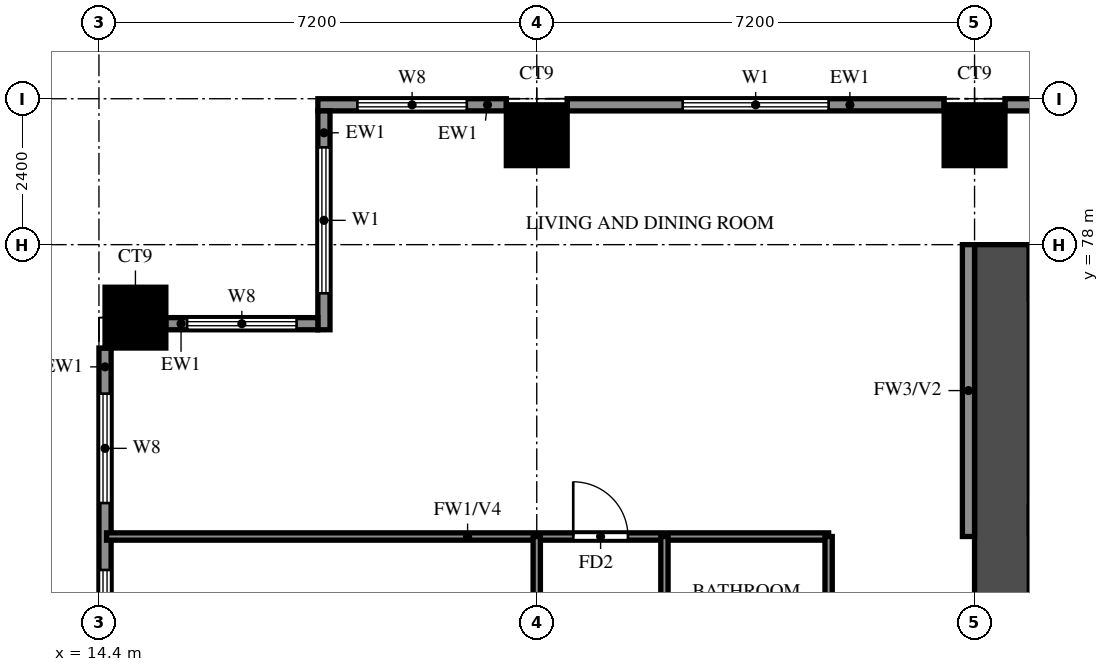
"""IFC4 building model, lengths in metres.
Left out: names, types, materials, properties, quantities, classifications, styles, units other than length and angle.
Written with IfcOpenShell. Run it as: python <this file> out.ifc"""

import sys

from ifc_helpers import new_model, si_unit, direction, frame, frame_2d, origin, origin_2d, place, context, subcontext, project, spatial, rectangle, extrude, source, transform, mapped, element, fill, save


model = new_model("IFC4")
c1 = context("Model", 3, precision=1e-05, world=origin(), true_north=direction((0.0, 1.0)))
c2 = subcontext(c1, "Body", "Model", "MODEL_VIEW")
j1 = project(units=[si_unit("LENGTHUNIT", "METRE"), si_unit("PLANEANGLEUNIT", "RADIAN")], contexts=[c1])
p1 = place(None, origin())
s1 = spatial("IfcSite", under=j1, at=p1, CompositionType="ELEMENT")
p2 = place(p1, origin())
s2 = spatial("IfcBuilding", under=s1, at=p2, CompositionType="ELEMENT")
p3 = place(p2, frame((0.0, 0.0, 76.0)))
s3 = spatial("IfcBuildingStorey", under=s2, at=p3, CompositionType="ELEMENT", Elevation=76.0)
m1 = source(origin(), c2, "Body", "SweptSolid", [
    extrude(rectangle(XDim=1.0, YDim=1.0, at=origin_2d()), origin(), (0.0, 0.0, 1.0), 3.18),
])
for number, where, z_axis, x_axis in (
    (1, (15.0, 76.8, 0.0), (0.0, 0.0, 1.0), (1.0, 0.0, 0.0)),
    (2, (21.6, 79.8, 0.0), (0.0, 0.0, 1.0), (1.0, 0.0, 0.0)),
    (3, (28.8, 79.8, 0.0), (0.0, 0.0, 1.0), (1.0, 0.0, 0.0)),
):
    element("IfcColumn", number, at=place(p3, frame(where, z_axis=z_axis, x_axis=x_axis)), inside=s3, PredefinedType="COLUMN", context=c2, shape_type="MappedRepresentation", body=[
        mapped(m1, transform((0.0, 0.0, 0.0))),
    ])
p4 = place(p3, frame((29.25, 66.0, 0.0), z_axis=(0.0, 0.0, 1.0), x_axis=(0.0, 1.0, 0.0)))
e4 = element("IfcWall", 4, at=p4, inside=s3, PredefinedType="SHEAR", context=c2, shape_type="SweptSolid", body=[
    extrude(rectangle(XDim=12.0, YDim=0.9, at=frame_2d((6.0, 0.0))), origin(), (0.0, 0.0, 1.0), 3.18),
])
p5 = place(p3, frame((29.7, 73.475, 0.0), z_axis=(0.0, 0.0, 1.0), x_axis=(1.0, 0.0, 0.0)))
e5 = element("IfcWall", 5, at=p5, inside=s3, PredefinedType="SHEAR", context=c2, shape_type="SweptSolid", body=[
    extrude(rectangle(XDim=3.175, YDim=0.45, at=frame_2d((1.587, 0.0))), origin(), (0.0, 0.0, 1.0), 3.18),
])
p6 = place(p3, frame((35.5, 80.3, 0.0), z_axis=(0.0, 0.0, 1.0), x_axis=(-1.0, 0.0, 0.0)))
e6 = element("IfcWall", 6, at=p6, inside=s3, PredefinedType="SOLIDWALL", context=c2, shape_type="SweptSolid", body=[
    extrude(rectangle(XDim=6.2, YDim=0.2, at=frame_2d((3.1, 0.0))), origin(), (0.0, 0.0, 1.0), 3.18),
])
p7 = place(p3, frame((28.3, 80.3, 0.0), z_axis=(0.0, 0.0, 1.0), x_axis=(-1.0, 0.0, 0.0)))
e7 = element("IfcWall", 7, at=p7, inside=s3, PredefinedType="SOLIDWALL", context=c2, shape_type="SweptSolid", body=[
    extrude(rectangle(XDim=6.2, YDim=0.2, at=frame_2d((3.1, 0.0))), origin(), (0.0, 0.0, 1.0), 3.18),
])
p8 = place(p7, frame((1.9, 0.0, 0.6)))
e8 = element("IfcOpeningElement", 8, at=p8, cuts=e7, PredefinedType="OPENING", context=c2, shape_type="SweptSolid", body=[
    extrude(rectangle(XDim=2.4, YDim=2.4, at=frame_2d((1.2, 1.2))), frame((0.0, 0.11, 0.0), z_axis=(0.0, -1.0, 0.0), x_axis=(1.0, 0.0, 0.0)), (0.0, 0.0, 1.0), 0.22),
])
p9 = place(p3, frame((21.1, 80.3, 0.0), z_axis=(0.0, 0.0, 1.0), x_axis=(-1.0, 0.0, 0.0)))
e9 = element("IfcWall", 9, at=p9, inside=s3, PredefinedType="SOLIDWALL", context=c2, shape_type="SweptSolid", body=[
    extrude(rectangle(XDim=3.1, YDim=0.2, at=frame_2d((1.55, 0.0))), origin(), (0.0, 0.0, 1.0), 3.18),
])
p10 = place(p9, frame((0.65, 0.0, 0.6)))
e10 = element("IfcOpeningElement", 10, at=p10, cuts=e9, PredefinedType="OPENING", context=c2, shape_type="SweptSolid", body=[
    extrude(rectangle(XDim=1.8, YDim=2.4, at=frame_2d((0.9, 1.2))), frame((0.0, 0.11, 0.0), z_axis=(0.0, -1.0, 0.0), x_axis=(1.0, 0.0, 0.0)), (0.0, 0.0, 1.0), 0.22),
])
p11 = place(p3, frame((18.1, 80.2, 0.0), z_axis=(0.0, 0.0, 1.0), x_axis=(0.0, -1.0, 0.0)))
e11 = element("IfcWall", 11, at=p11, inside=s3, PredefinedType="SOLIDWALL", context=c2, shape_type="SweptSolid", body=[
    extrude(rectangle(XDim=3.6, YDim=0.2, at=frame_2d((1.8, 0.0))), origin(), (0.0, 0.0, 1.0), 3.18),
])
p12 = place(p11, frame((0.6, 0.0, 0.6)))
e12 = element("IfcOpeningElement", 12, at=p12, cuts=e11, PredefinedType="OPENING", context=c2, shape_type="SweptSolid", body=[
    extrude(rectangle(XDim=2.4, YDim=2.4, at=frame_2d((1.2, 1.2))), frame((0.0, 0.11, 0.0), z_axis=(0.0, -1.0, 0.0), x_axis=(1.0, 0.0, 0.0)), (0.0, 0.0, 1.0), 0.22),
])
p13 = place(p3, frame((18.0, 76.7, 0.0), z_axis=(0.0, 0.0, 1.0), x_axis=(-1.0, 0.0, 0.0)))
e13 = element("IfcWall", 13, at=p13, inside=s3, PredefinedType="SOLIDWALL", context=c2, shape_type="SweptSolid", body=[
    extrude(rectangle(XDim=2.5, YDim=0.2, at=frame_2d((1.25, 0.0))), origin(), (0.0, 0.0, 1.0), 3.18),
])
p14 = place(p13, frame((0.35, 0.0, 0.6)))
e14 = element("IfcOpeningElement", 14, at=p14, cuts=e13, PredefinedType="OPENING", context=c2, shape_type="SweptSolid", body=[
    extrude(rectangle(XDim=1.8, YDim=2.4, at=frame_2d((0.9, 1.2))), frame((0.0, 0.11, 0.0), z_axis=(0.0, -1.0, 0.0), x_axis=(1.0, 0.0, 0.0)), (0.0, 0.0, 1.0), 0.22),
])
p15 = place(p3, frame((14.5, 76.3, 0.0), z_axis=(0.0, 0.0, 1.0), x_axis=(0.0, -1.0, 0.0)))
e15 = element("IfcWall", 15, at=p15, inside=s3, PredefinedType="SOLIDWALL", context=c2, shape_type="SweptSolid", body=[
    extrude(rectangle(XDim=6.2, YDim=0.2, at=frame_2d((3.1, 0.0))), origin(), (0.0, 0.0, 1.0), 3.18),
])
p16 = place(p15, frame((3.65, 0.0, 0.6)))
e16 = element("IfcOpeningElement", 16, at=p16, cuts=e15, PredefinedType="OPENING", context=c2, shape_type="SweptSolid", body=[
    extrude(rectangle(XDim=1.8, YDim=2.4, at=frame_2d((0.9, 1.2))), frame((0.0, 0.11, 0.0), z_axis=(0.0, -1.0, 0.0), x_axis=(1.0, 0.0, 0.0)), (0.0, 0.0, 1.0), 0.22),
])
p17 = place(p15, frame((0.75, 0.0, 0.6)))
e17 = element("IfcOpeningElement", 17, at=p17, cuts=e15, PredefinedType="OPENING", context=c2, shape_type="SweptSolid", body=[
    extrude(rectangle(XDim=1.8, YDim=2.4, at=frame_2d((0.9, 1.2))), frame((0.0, 0.11, 0.0), z_axis=(0.0, -1.0, 0.0), x_axis=(1.0, 0.0, 0.0)), (0.0, 0.0, 1.0), 0.22),
])
p18 = place(p3, frame((28.7, 73.2, 0.0), z_axis=(0.0, 0.0, 1.0), x_axis=(0.0, 1.0, 0.0)))
e18 = element("IfcWall", 18, at=p18, inside=s3, PredefinedType="SOLIDWALL", context=c2, shape_type="SweptSolid", body=[
    extrude(rectangle(XDim=4.8, YDim=0.2, at=frame_2d((2.4, 0.0))), origin(), (0.0, 0.0, 1.0), 3.18),
])
p19 = place(p3, frame((14.525, 73.2, 0.0), z_axis=(0.0, 0.0, 1.0), x_axis=(1.0, 0.0, 0.0)))
e19 = element("IfcWall", 19, at=p19, inside=s3, PredefinedType="PARTITIONING", context=c2, shape_type="SweptSolid", body=[
    extrude(rectangle(XDim=11.875, YDim=0.12, at=frame_2d((5.938, 0.0))), origin(), (0.0, 0.0, 1.0), 2.28),
])
p20 = place(p19, frame((7.675, 0.0, 0.0)))
e20 = element("IfcOpeningElement", 20, at=p20, cuts=e19, PredefinedType="OPENING", context=c2, shape_type="SweptSolid", body=[
    extrude(rectangle(XDim=0.9, YDim=2.1, at=frame_2d((0.45, 1.05))), frame((0.0, 0.07, 0.0), z_axis=(0.0, -1.0, 0.0), x_axis=(1.0, 0.0, 0.0)), (0.0, 0.0, 1.0), 0.14),
])
p21 = place(p3, frame((21.6, 33.725, 0.0), z_axis=(0.0, 0.0, 1.0), x_axis=(0.0, 1.0, 0.0)))
e21 = element("IfcWall", 21, at=p21, inside=s3, PredefinedType="PARTITIONING", context=c2, shape_type="SweptSolid", body=[
    extrude(rectangle(XDim=39.475, YDim=0.12, at=frame_2d((19.737, 0.0))), origin(), (0.0, 0.0, 1.0), 3.18),
])
p22 = place(p21, frame((7.775, 0.0, 0.0)))
e22 = element("IfcOpeningElement", 22, at=p22, cuts=e21, PredefinedType="OPENING", context=c2, shape_type="SweptSolid", body=[
    extrude(rectangle(XDim=0.9, YDim=2.1, at=frame_2d((0.45, 1.05))), frame((0.0, 0.07, 0.0), z_axis=(0.0, -1.0, 0.0), x_axis=(1.0, 0.0, 0.0)), (0.0, 0.0, 1.0), 0.14),
])
p23 = place(p21, frame((17.125, 0.0, 0.0)))
e23 = element("IfcOpeningElement", 23, at=p23, cuts=e21, PredefinedType="OPENING", context=c2, shape_type="SweptSolid", body=[
    extrude(rectangle(XDim=1.5, YDim=2.1, at=frame_2d((0.75, 1.05))), frame((0.0, 0.07, 0.0), z_axis=(0.0, -1.0, 0.0), x_axis=(1.0, 0.0, 0.0)), (0.0, 0.0, 1.0), 0.14),
])
p24 = place(p21, frame((22.825, 0.0, 0.0)))
e24 = element("IfcOpeningElement", 24, at=p24, cuts=e21, PredefinedType="OPENING", context=c2, shape_type="SweptSolid", body=[
    extrude(rectangle(XDim=0.9, YDim=2.1, at=frame_2d((0.45, 1.05))), frame((0.0, 0.07, 0.0), z_axis=(0.0, -1.0, 0.0), x_axis=(1.0, 0.0, 0.0)), (0.0, 0.0, 1.0), 0.14),
])
p25 = place(p21, frame((26.425, 0.0, 0.0)))
e25 = element("IfcOpeningElement", 25, at=p25, cuts=e21, PredefinedType="OPENING", context=c2, shape_type="SweptSolid", body=[
    extrude(rectangle(XDim=0.9, YDim=2.1, at=frame_2d((0.45, 1.05))), frame((0.0, 0.07, 0.0), z_axis=(0.0, -1.0, 0.0), x_axis=(1.0, 0.0, 0.0)), (0.0, 0.0, 1.0), 0.14),
])
p26 = place(p21, frame((30.025, 0.0, 0.0)))
e26 = element("IfcOpeningElement", 26, at=p26, cuts=e21, PredefinedType="OPENING", context=c2, shape_type="SweptSolid", body=[
    extrude(rectangle(XDim=0.9, YDim=2.1, at=frame_2d((0.45, 1.05))), frame((0.0, 0.07, 0.0), z_axis=(0.0, -1.0, 0.0), x_axis=(1.0, 0.0, 0.0)), (0.0, 0.0, 1.0), 0.14),
])
p27 = place(p21, frame((33.625, 0.0, 0.0)))
e27 = element("IfcOpeningElement", 27, at=p27, cuts=e21, PredefinedType="OPENING", context=c2, shape_type="SweptSolid", body=[
    extrude(rectangle(XDim=0.9, YDim=2.1, at=frame_2d((0.45, 1.05))), frame((0.0, 0.07, 0.0), z_axis=(0.0, -1.0, 0.0), x_axis=(1.0, 0.0, 0.0)), (0.0, 0.0, 1.0), 0.14),
])
p28 = place(p21, frame((37.225, 0.0, 0.0)))
e28 = element("IfcOpeningElement", 28, at=p28, cuts=e21, PredefinedType="OPENING", context=c2, shape_type="SweptSolid", body=[
    extrude(rectangle(XDim=0.9, YDim=2.1, at=frame_2d((0.45, 1.05))), frame((0.0, 0.07, 0.0), z_axis=(0.0, -1.0, 0.0), x_axis=(1.0, 0.0, 0.0)), (0.0, 0.0, 1.0), 0.14),
])
p29 = place(p3, frame((23.7, 64.8, 0.0), z_axis=(0.0, 0.0, 1.0), x_axis=(0.0, 1.0, 0.0)))
e29 = element("IfcWall", 29, at=p29, inside=s3, PredefinedType="PARTITIONING", context=c2, shape_type="SweptSolid", body=[
    extrude(rectangle(XDim=8.4, YDim=0.12, at=frame_2d((4.2, 0.0))), origin(), (0.0, 0.0, 1.0), 3.18),
])
p30 = place(p29, frame((1.875, 0.0, 0.0)))
e30 = element("IfcOpeningElement", 30, at=p30, cuts=e29, PredefinedType="OPENING", context=c2, shape_type="SweptSolid", body=[
    extrude(rectangle(XDim=0.9, YDim=2.1, at=frame_2d((0.45, 1.05))), frame((0.0, 0.07, 0.0), z_axis=(0.0, -1.0, 0.0), x_axis=(1.0, 0.0, 0.0)), (0.0, 0.0, 1.0), 0.14),
])
p31 = place(p29, frame((6.125, 0.0, 0.0)))
e31 = element("IfcOpeningElement", 31, at=p31, cuts=e29, PredefinedType="OPENING", context=c2, shape_type="SweptSolid", body=[
    extrude(rectangle(XDim=0.8, YDim=2.1, at=frame_2d((0.4, 1.05))), frame((0.0, 0.07, 0.0), z_axis=(0.0, -1.0, 0.0), x_axis=(1.0, 0.0, 0.0)), (0.0, 0.0, 1.0), 0.14),
])
p32 = place(p3, frame((26.4, 69.62, 0.0), z_axis=(0.0, 0.0, 1.0), x_axis=(0.0, 1.0, 0.0)))
e32 = element("IfcWall", 32, at=p32, inside=s3, PredefinedType="PARTITIONING", context=c2, shape_type="SweptSolid", body=[
    extrude(rectangle(XDim=3.58, YDim=0.12, at=frame_2d((1.79, 0.0))), origin(), (0.0, 0.0, 1.0), 3.18),
])
p33 = place(p8, origin())
e33 = element("IfcWindow", 33, at=p33, inside=s3, PartitioningType="DOUBLE_PANEL_VERTICAL", PredefinedType="WINDOW", context=c2, shape_type="SweptSolid", body=[
    extrude(rectangle(XDim=2.4, YDim=2.4, at=frame_2d((1.2, 1.2))), frame((0.0, 0.03, 0.0), z_axis=(0.0, -1.0, 0.0), x_axis=(1.0, 0.0, 0.0)), (0.0, 0.0, 1.0), 0.06),
])
fill(e8, e33)
p34 = place(p10, origin())
e34 = element("IfcWindow", 34, at=p34, inside=s3, PartitioningType="DOUBLE_PANEL_VERTICAL", PredefinedType="WINDOW", context=c2, shape_type="SweptSolid", body=[
    extrude(rectangle(XDim=1.8, YDim=2.4, at=frame_2d((0.9, 1.2))), frame((0.0, 0.03, 0.0), z_axis=(0.0, -1.0, 0.0), x_axis=(1.0, 0.0, 0.0)), (0.0, 0.0, 1.0), 0.06),
])
fill(e10, e34)
p35 = place(p12, origin())
e35 = element("IfcWindow", 35, at=p35, inside=s3, PartitioningType="DOUBLE_PANEL_VERTICAL", PredefinedType="WINDOW", context=c2, shape_type="SweptSolid", body=[
    extrude(rectangle(XDim=2.4, YDim=2.4, at=frame_2d((1.2, 1.2))), frame((0.0, 0.03, 0.0), z_axis=(0.0, -1.0, 0.0), x_axis=(1.0, 0.0, 0.0)), (0.0, 0.0, 1.0), 0.06),
])
fill(e12, e35)
p36 = place(p14, origin())
e36 = element("IfcWindow", 36, at=p36, inside=s3, PartitioningType="DOUBLE_PANEL_VERTICAL", PredefinedType="WINDOW", context=c2, shape_type="SweptSolid", body=[
    extrude(rectangle(XDim=1.8, YDim=2.4, at=frame_2d((0.9, 1.2))), frame((0.0, 0.03, 0.0), z_axis=(0.0, -1.0, 0.0), x_axis=(1.0, 0.0, 0.0)), (0.0, 0.0, 1.0), 0.06),
])
fill(e14, e36)
p37 = place(p16, origin())
e37 = element("IfcWindow", 37, at=p37, inside=s3, PartitioningType="DOUBLE_PANEL_VERTICAL", PredefinedType="WINDOW", context=c2, shape_type="SweptSolid", body=[
    extrude(rectangle(XDim=1.8, YDim=2.4, at=frame_2d((0.9, 1.2))), frame((0.0, 0.03, 0.0), z_axis=(0.0, -1.0, 0.0), x_axis=(1.0, 0.0, 0.0)), (0.0, 0.0, 1.0), 0.06),
])
fill(e16, e37)
p38 = place(p17, origin())
e38 = element("IfcWindow", 38, at=p38, inside=s3, PartitioningType="DOUBLE_PANEL_VERTICAL", PredefinedType="WINDOW", context=c2, shape_type="SweptSolid", body=[
    extrude(rectangle(XDim=1.8, YDim=2.4, at=frame_2d((0.9, 1.2))), frame((0.0, 0.03, 0.0), z_axis=(0.0, -1.0, 0.0), x_axis=(1.0, 0.0, 0.0)), (0.0, 0.0, 1.0), 0.06),
])
fill(e17, e38)
p39 = place(p20, origin())
e39 = element("IfcDoor", 39, at=p39, inside=s3, OperationType="SINGLE_SWING_RIGHT", PredefinedType="DOOR", context=c2, shape_type="SweptSolid", body=[
    extrude(rectangle(XDim=0.9, YDim=2.1, at=frame_2d((0.45, 1.05))), frame((0.0, 0.025, 0.0), z_axis=(0.0, -1.0, 0.0), x_axis=(1.0, 0.0, 0.0)), (0.0, 0.0, 1.0), 0.05),
])
fill(e20, e39)
save(model, sys.argv[1])
